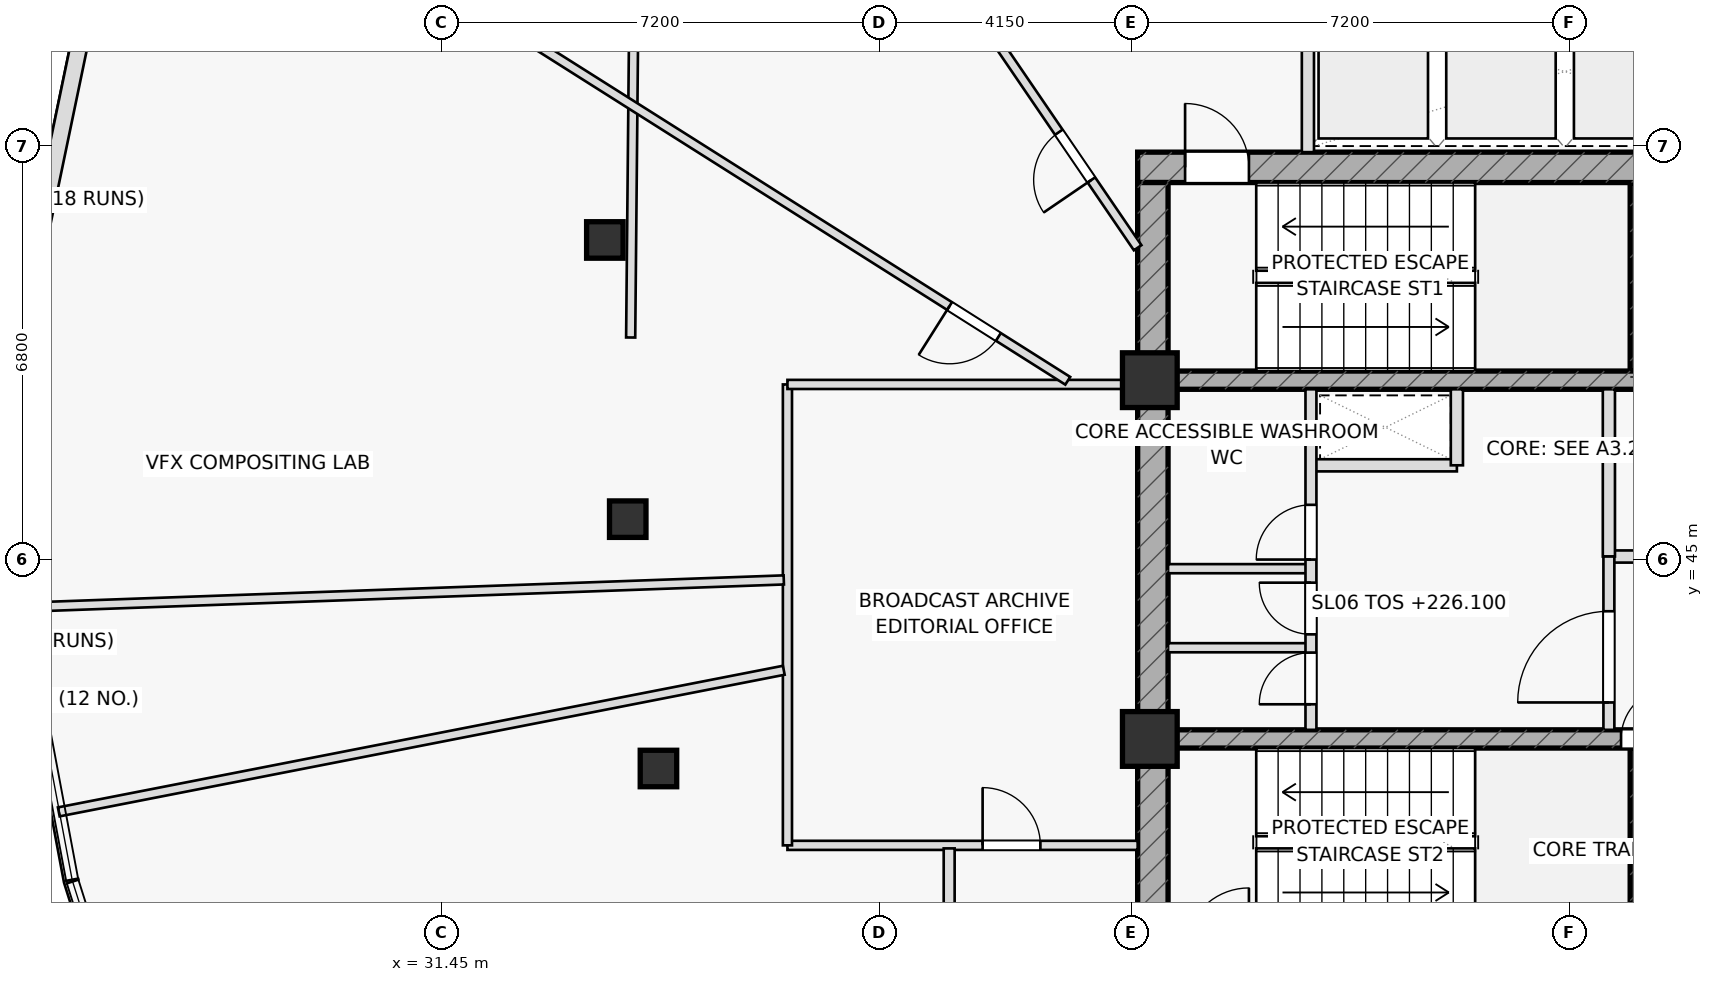
"""IFC4 building model, lengths in metres.
Left out: names, types, materials, properties, quantities, classifications, styles, units other than length and angle.
Written with IfcOpenShell. Run it as: python <this file> out.ifc"""

import sys

from ifc_helpers import new_model, si_unit, direction, frame, frame_2d, origin, origin_2d, place, context, subcontext, project, spatial, rectangle, hollow_rectangle, extrude, element, fill, save


model = new_model("IFC4")
c1 = context("Model", 3, precision=1e-05, world=origin(), true_north=direction((0.0, 1.0)))
c2 = subcontext(c1, "Body", "Model", "MODEL_VIEW")
j1 = project(units=[si_unit("LENGTHUNIT", "METRE"), si_unit("PLANEANGLEUNIT", "RADIAN")], contexts=[c1])
p1 = place(None, origin())
s1 = spatial("IfcSite", under=j1, at=p1, CompositionType="ELEMENT")
p2 = place(p1, origin())
s2 = spatial("IfcBuilding", under=s1, at=p2, CompositionType="ELEMENT")
p3 = place(p2, frame((0.0, 0.0, 226.1)))
s3 = spatial("IfcBuildingStorey", under=s2, at=p3, CompositionType="ELEMENT", Elevation=226.1)
for number, where, z_axis, x_axis in (
    (1, (51.11, 48.1, 0.0), (0.0, 0.0, 1.0), (0.0, 1.0, 0.0)),
    (2, (51.11, 38.8, 0.0), (0.0, 0.0, 1.0), (0.0, 1.0, 0.0)),
):
    element("IfcWall", number, at=place(p3, frame(where, z_axis=z_axis, x_axis=x_axis)), inside=s3, PredefinedType="SHEAR", context=c2, shape_type="SweptSolid", body=[
        extrude(rectangle(XDim=3.1, YDim=0.22, at=frame_2d((1.55, 0.0))), origin(), (0.0, 0.0, 1.0), 3.65),
    ])
p4 = place(p3, frame((42.9, 51.45, 0.0), z_axis=(0.0, 0.0, 1.0), x_axis=(1.0, 0.0, 0.0)))
e3 = element("IfcWall", 3, at=p4, inside=s3, PredefinedType="SHEAR", context=c2, shape_type="SweptSolid", body=[
    extrude(rectangle(XDim=14.2, YDim=0.5, at=frame_2d((7.1, 0.0))), origin(), (0.0, 0.0, 1.0), 3.65),
])
p5 = place(p4, frame((0.78, 0.0, 0.0)))
e4 = element("IfcOpeningElement", 4, at=p5, cuts=e3, PredefinedType="OPENING", context=c2, shape_type="SweptSolid", body=[
    extrude(rectangle(XDim=1.05, YDim=2.2, at=frame_2d((0.525, 1.1))), frame((0.0, 0.26, 0.0), z_axis=(0.0, -1.0, 0.0), x_axis=(1.0, 0.0, 0.0)), (0.0, 0.0, 1.0), 0.52),
])
p6 = place(p3, frame((43.15, 38.8, 0.0), z_axis=(0.0, 0.0, 1.0), x_axis=(0.0, 1.0, 0.0)))
e5 = element("IfcWall", 5, at=p6, inside=s3, PredefinedType="SHEAR", context=c2, shape_type="SweptSolid", body=[
    extrude(rectangle(XDim=12.4, YDim=0.5, at=frame_2d((6.2, 0.0))), origin(), (0.0, 0.0, 1.0), 3.65),
])
p7 = place(p3, frame((43.4, 47.95, 0.0), z_axis=(0.0, 0.0, 1.0), x_axis=(1.0, 0.0, 0.0)))
e6 = element("IfcWall", 6, at=p7, inside=s3, PredefinedType="SHEAR", context=c2, shape_type="SweptSolid", body=[
    extrude(rectangle(XDim=13.2, YDim=0.3, at=frame_2d((6.6, 0.0))), origin(), (0.0, 0.0, 1.0), 3.65),
])
p8 = place(p7, frame((8.345, 0.0, 0.0)))
e7 = element("IfcOpeningElement", 7, at=p8, cuts=e6, PredefinedType="OPENING", context=c2, shape_type="SweptSolid", body=[
    extrude(rectangle(XDim=1.15, YDim=2.2, at=frame_2d((0.575, 1.1))), frame((0.0, 0.16, 0.0), z_axis=(0.0, -1.0, 0.0), x_axis=(1.0, 0.0, 0.0)), (0.0, 0.0, 1.0), 0.32),
])
p9 = place(p7, frame((10.065, 0.0, 0.0)))
e8 = element("IfcOpeningElement", 8, at=p9, cuts=e6, PredefinedType="OPENING", context=c2, shape_type="SweptSolid", body=[
    extrude(rectangle(XDim=1.15, YDim=2.2, at=frame_2d((0.575, 1.1))), frame((0.0, 0.16, 0.0), z_axis=(0.0, -1.0, 0.0), x_axis=(1.0, 0.0, 0.0)), (0.0, 0.0, 1.0), 0.32),
])
p10 = place(p7, frame((11.645, 0.0, 0.0)))
e9 = element("IfcOpeningElement", 9, at=p10, cuts=e6, PredefinedType="OPENING", context=c2, shape_type="SweptSolid", body=[
    extrude(rectangle(XDim=1.15, YDim=2.2, at=frame_2d((0.575, 1.1))), frame((0.0, 0.16, 0.0), z_axis=(0.0, -1.0, 0.0), x_axis=(1.0, 0.0, 0.0)), (0.0, 0.0, 1.0), 0.32),
])
p11 = place(p3, frame((43.4, 42.05, 0.0), z_axis=(0.0, 0.0, 1.0), x_axis=(1.0, 0.0, 0.0)))
e10 = element("IfcWall", 10, at=p11, inside=s3, PredefinedType="SHEAR", context=c2, shape_type="SweptSolid", body=[
    extrude(rectangle(XDim=13.2, YDim=0.3, at=frame_2d((6.6, 0.0))), origin(), (0.0, 0.0, 1.0), 3.65),
])
p12 = place(p11, frame((7.45, 0.0, 0.0)))
e11 = element("IfcOpeningElement", 11, at=p12, cuts=e10, PredefinedType="OPENING", context=c2, shape_type="SweptSolid", body=[
    extrude(rectangle(XDim=0.85, YDim=2.05, at=frame_2d((0.425, 1.025))), frame((0.0, 0.16, 0.0), z_axis=(0.0, -1.0, 0.0), x_axis=(1.0, 0.0, 0.0)), (0.0, 0.0, 1.0), 0.32),
])
p13 = place(p11, frame((9.5, 0.0, 0.0)))
e12 = element("IfcOpeningElement", 12, at=p13, cuts=e10, PredefinedType="OPENING", context=c2, shape_type="SweptSolid", body=[
    extrude(rectangle(XDim=0.85, YDim=2.05, at=frame_2d((0.425, 1.025))), frame((0.0, 0.16, 0.0), z_axis=(0.0, -1.0, 0.0), x_axis=(1.0, 0.0, 0.0)), (0.0, 0.0, 1.0), 0.32),
])
p14 = place(p11, frame((11.6, 0.0, 0.0)))
e13 = element("IfcOpeningElement", 13, at=p14, cuts=e10, PredefinedType="OPENING", context=c2, shape_type="SweptSolid", body=[
    extrude(rectangle(XDim=0.85, YDim=2.05, at=frame_2d((0.425, 1.025))), frame((0.0, 0.16, 0.0), z_axis=(0.0, -1.0, 0.0), x_axis=(1.0, 0.0, 0.0)), (0.0, 0.0, 1.0), 0.32),
])
for number, where, z_axis, x_axis in (
    (14, (43.1, 47.95, 0.0), (0.0, 0.0, 1.0), (1.0, 0.0, 0.0)),
    (15, (43.1, 42.05, 0.0), (0.0, 0.0, 1.0), (1.0, 0.0, 0.0)),
):
    element("IfcColumn", number, at=place(p3, frame(where, z_axis=z_axis, x_axis=x_axis)), inside=s3, PredefinedType="COLUMN", context=c2, shape_type="SweptSolid", body=[
        extrude(rectangle(XDim=0.9, YDim=0.9, at=origin_2d()), origin(), (0.0, 0.0, 1.0), 3.65),
    ])
for number, where, z_axis, x_axis in (
    (16, (34.137, 50.256, 0.0), (0.0, 0.0, 1.0), (1.0, 0.0, 0.0)),
    (17, (34.514, 45.665, 0.0), (0.0, 0.0, 1.0), (1.0, 0.0, 0.0)),
    (18, (35.019, 41.564, 0.0), (0.0, 0.0, 1.0), (1.0, 0.0, 0.0)),
):
    element("IfcColumn", number, at=place(p3, frame(where, z_axis=z_axis, x_axis=x_axis)), inside=s3, PredefinedType="COLUMN", context=c2, shape_type="SweptSolid", body=[
        extrude(hollow_rectangle(XDim=0.6, YDim=0.6, WallThickness=0.036, at=origin_2d()), origin(), (0.0, 0.0, 1.0), 3.65),
    ])
p15 = place(p3, frame((45.7, 51.7, 0.0), z_axis=(0.0, 0.0, 1.0), x_axis=(0.0, 1.0, 0.0)))
e19 = element("IfcWall", 19, at=p15, inside=s3, PredefinedType="PARTITIONING", context=c2, shape_type="SweptSolid", body=[
    extrude(rectangle(XDim=2.6, YDim=0.2, at=frame_2d((1.3, 0.0))), origin(), (0.0, 0.0, 1.0), 3.65),
])
p16 = place(p3, frame((45.75, 46.55, 0.0), z_axis=(0.0, 0.0, 1.0), x_axis=(1.0, 0.0, 0.0)))
e20 = element("IfcWall", 20, at=p16, inside=s3, PredefinedType="PARTITIONING", context=c2, shape_type="SweptSolid", body=[
    extrude(rectangle(XDim=2.4, YDim=0.2, at=frame_2d((1.2, 0.0))), origin(), (0.0, 0.0, 1.0), 3.65),
])
p17 = place(p3, frame((48.15, 46.55, 0.0), z_axis=(0.0, 0.0, 1.0), x_axis=(0.0, 1.0, 0.0)))
e21 = element("IfcWall", 21, at=p17, inside=s3, PredefinedType="PARTITIONING", context=c2, shape_type="SweptSolid", body=[
    extrude(rectangle(XDim=1.25, YDim=0.2, at=frame_2d((0.625, 0.0))), origin(), (0.0, 0.0, 1.0), 3.65),
])
p18 = place(p3, frame((50.65, 45.05, 0.0), z_axis=(0.0, 0.0, 1.0), x_axis=(1.0, 0.0, 0.0)))
e22 = element("IfcWall", 22, at=p18, inside=s3, PredefinedType="PARTITIONING", context=c2, shape_type="SweptSolid", body=[
    extrude(rectangle(XDim=5.95, YDim=0.2, at=frame_2d((2.975, 0.0))), origin(), (0.0, 0.0, 1.0), 3.65),
])
p19 = place(p18, frame((1.35, 0.0, 0.0)))
e23 = element("IfcOpeningElement", 23, at=p19, cuts=e22, PredefinedType="OPENING", context=c2, shape_type="SweptSolid", body=[
    extrude(rectangle(XDim=1.5, YDim=2.2, at=frame_2d((0.75, 1.1))), frame((0.0, 0.11, 0.0), z_axis=(0.0, -1.0, 0.0), x_axis=(1.0, 0.0, 0.0)), (0.0, 0.0, 1.0), 0.22),
])
p20 = place(p3, frame((50.65, 45.05, 0.0), z_axis=(0.0, 0.0, 1.0), x_axis=(0.0, 1.0, 0.0)))
e24 = element("IfcWall", 24, at=p20, inside=s3, PredefinedType="PARTITIONING", context=c2, shape_type="SweptSolid", body=[
    extrude(rectangle(XDim=2.75, YDim=0.2, at=frame_2d((1.375, 0.0))), origin(), (0.0, 0.0, 1.0), 3.65),
])
p21 = place(p3, frame((50.65, 42.2, 0.0), z_axis=(0.0, 0.0, 1.0), x_axis=(0.0, 1.0, 0.0)))
e25 = element("IfcWall", 25, at=p21, inside=s3, PredefinedType="PARTITIONING", context=c2, shape_type="SweptSolid", body=[
    extrude(rectangle(XDim=2.85, YDim=0.18, at=frame_2d((1.425, 0.0))), origin(), (0.0, 0.0, 1.0), 3.65),
])
p22 = place(p21, frame((0.45, 0.0, 0.0)))
e26 = element("IfcOpeningElement", 26, at=p22, cuts=e25, PredefinedType="OPENING", context=c2, shape_type="SweptSolid", body=[
    extrude(rectangle(XDim=1.5, YDim=2.2, at=frame_2d((0.75, 1.1))), frame((0.0, 0.1, 0.0), z_axis=(0.0, -1.0, 0.0), x_axis=(1.0, 0.0, 0.0)), (0.0, 0.0, 1.0), 0.2),
])
for number, where, z_axis, x_axis in (
    (27, (43.4, 43.55, 0.0), (0.0, 0.0, 1.0), (1.0, 0.0, 0.0)),
    (28, (43.4, 44.85, 0.0), (0.0, 0.0, 1.0), (1.0, 0.0, 0.0)),
):
    element("IfcWall", number, at=place(p3, frame(where, z_axis=z_axis, x_axis=x_axis)), inside=s3, PredefinedType="PARTITIONING", context=c2, shape_type="SweptSolid", body=[
        extrude(rectangle(XDim=2.35, YDim=0.15, at=frame_2d((1.175, 0.0))), origin(), (0.0, 0.0, 1.0), 3.65),
    ])
p23 = place(p3, frame((45.75, 42.2, 0.0), z_axis=(0.0, 0.0, 1.0), x_axis=(0.0, 1.0, 0.0)))
e29 = element("IfcWall", 29, at=p23, inside=s3, PredefinedType="PARTITIONING", context=c2, shape_type="SweptSolid", body=[
    extrude(rectangle(XDim=5.6, YDim=0.18, at=frame_2d((2.8, 0.0))), origin(), (0.0, 0.0, 1.0), 3.65),
])
p24 = place(p23, frame((0.42, 0.0, 0.0)))
e30 = element("IfcOpeningElement", 30, at=p24, cuts=e29, PredefinedType="OPENING", context=c2, shape_type="SweptSolid", body=[
    extrude(rectangle(XDim=0.85, YDim=2.05, at=frame_2d((0.425, 1.025))), frame((0.0, 0.1, 0.0), z_axis=(0.0, -1.0, 0.0), x_axis=(1.0, 0.0, 0.0)), (0.0, 0.0, 1.0), 0.2),
])
p25 = place(p23, frame((1.57, 0.0, 0.0)))
e31 = element("IfcOpeningElement", 31, at=p25, cuts=e29, PredefinedType="OPENING", context=c2, shape_type="SweptSolid", body=[
    extrude(rectangle(XDim=0.85, YDim=2.05, at=frame_2d((0.425, 1.025))), frame((0.0, 0.1, 0.0), z_axis=(0.0, -1.0, 0.0), x_axis=(1.0, 0.0, 0.0)), (0.0, 0.0, 1.0), 0.2),
])
p26 = place(p23, frame((2.8, 0.0, 0.0)))
e32 = element("IfcOpeningElement", 32, at=p26, cuts=e29, PredefinedType="OPENING", context=c2, shape_type="SweptSolid", body=[
    extrude(rectangle(XDim=0.9, YDim=2.05, at=frame_2d((0.45, 1.025))), frame((0.0, 0.1, 0.0), z_axis=(0.0, -1.0, 0.0), x_axis=(1.0, 0.0, 0.0)), (0.0, 0.0, 1.0), 0.2),
])
p27 = place(p3, frame((34.652, 58.056, 0.0), z_axis=(0.0, 0.0, 1.0), x_axis=(-0.009553538759, -0.999954363907, 0.0)))
e33 = element("IfcWall", 33, at=p27, inside=s3, PredefinedType="PARTITIONING", context=c2, shape_type="SweptSolid", body=[
    extrude(rectangle(XDim=9.404, YDim=0.15, at=frame_2d((4.702, 0.0))), origin(), (0.0, 0.0, 1.0), 3.135),
])
p28 = place(p3, frame((37.14, 40.3, 0.0), z_axis=(0.0, 0.0, 1.0), x_axis=(1.0, 0.0, 0.0)))
e34 = element("IfcWall", 34, at=p28, inside=s3, PredefinedType="PARTITIONING", context=c2, shape_type="SweptSolid", body=[
    extrude(rectangle(XDim=5.76, YDim=0.15, at=frame_2d((2.88, 0.0))), origin(), (0.0, 0.0, 1.0), 3.025),
])
p29 = place(p28, frame((3.21, 0.0, 0.0)))
e35 = element("IfcOpeningElement", 35, at=p29, cuts=e34, PredefinedType="OPENING", context=c2, shape_type="SweptSolid", body=[
    extrude(rectangle(XDim=0.95, YDim=2.05, at=frame_2d((0.475, 1.025))), frame((0.0, 0.085, 0.0), z_axis=(0.0, -1.0, 0.0), x_axis=(1.0, 0.0, 0.0)), (0.0, 0.0, 1.0), 0.17),
])
p30 = place(p3, frame((37.14, 40.3, 0.0), z_axis=(0.0, 0.0, 1.0), x_axis=(0.0, 1.0, 0.0)))
e36 = element("IfcWall", 36, at=p30, inside=s3, PredefinedType="PARTITIONING", context=c2, shape_type="SweptSolid", body=[
    extrude(rectangle(XDim=7.58, YDim=0.15, at=frame_2d((3.79, 0.0))), origin(), (0.0, 0.0, 1.0), 3.65),
])
p31 = place(p3, frame((37.14, 47.88, 0.0), z_axis=(0.0, 0.0, 1.0), x_axis=(1.0, 0.0, 0.0)))
e37 = element("IfcWall", 37, at=p31, inside=s3, PredefinedType="PARTITIONING", context=c2, shape_type="SweptSolid", body=[
    extrude(rectangle(XDim=5.76, YDim=0.15, at=frame_2d((2.88, 0.0))), origin(), (0.0, 0.0, 1.0), 3.025),
])
p32 = place(p3, frame((42.9, 50.128, 0.0), z_axis=(0.0, 0.0, 1.0), x_axis=(-0.563748413046, 0.825946564124, 0.0)))
e38 = element("IfcWall", 38, at=p32, inside=s3, PredefinedType="PARTITIONING", context=c2, shape_type="SweptSolid", body=[
    extrude(rectangle(XDim=19.083, YDim=0.15, at=frame_2d((9.542, 0.0))), origin(), (0.0, 0.0, 1.0), 3.025),
])
p33 = place(p32, frame((1.35, 0.0, 0.0)))
e39 = element("IfcOpeningElement", 39, at=p33, cuts=e38, PredefinedType="OPENING", context=c2, shape_type="SweptSolid", body=[
    extrude(rectangle(XDim=0.95, YDim=2.05, at=frame_2d((0.475, 1.025))), frame((0.0, 0.085, 0.0), z_axis=(0.0, -1.0, 0.0), x_axis=(1.0, 0.0, 0.0)), (0.0, 0.0, 1.0), 0.17),
])
p34 = place(p3, frame((41.75, 47.94, 0.0), z_axis=(0.0, 0.0, 1.0), x_axis=(-0.845215418547, 0.534425763086, 0.0)))
e40 = element("IfcWall", 40, at=p34, inside=s3, PredefinedType="PARTITIONING", context=c2, shape_type="SweptSolid", body=[
    extrude(rectangle(XDim=18.802, YDim=0.15, at=frame_2d((9.401, 0.0))), origin(), (0.0, 0.0, 1.0), 3.025),
])
p35 = place(p34, frame((1.35, 0.0, 0.0)))
e41 = element("IfcOpeningElement", 41, at=p35, cuts=e40, PredefinedType="OPENING", context=c2, shape_type="SweptSolid", body=[
    extrude(rectangle(XDim=0.95, YDim=2.05, at=frame_2d((0.475, 1.025))), frame((0.0, 0.085, 0.0), z_axis=(0.0, -1.0, 0.0), x_axis=(1.0, 0.0, 0.0)), (0.0, 0.0, 1.0), 0.17),
])
p36 = place(p3, frame((37.08, 44.665, 0.0), z_axis=(0.0, 0.0, 1.0), x_axis=(-0.999354882677, -0.035914042805, 0.0)))
e42 = element("IfcWall", 42, at=p36, inside=s3, PredefinedType="PARTITIONING", context=c2, shape_type="SweptSolid", body=[
    extrude(rectangle(XDim=12.562, YDim=0.15, at=frame_2d((6.281, 0.0))), origin(), (0.0, 0.0, 1.0), 3.135),
])
p37 = place(p3, frame((37.08, 43.179, 0.0), z_axis=(0.0, 0.0, 1.0), x_axis=(-0.981454920946, -0.19169308321, 0.0)))
e43 = element("IfcWall", 43, at=p37, inside=s3, PredefinedType="PARTITIONING", context=c2, shape_type="SweptSolid", body=[
    extrude(rectangle(XDim=12.149, YDim=0.15, at=frame_2d((6.074, 0.0))), origin(), (0.0, 0.0, 1.0), 3.135),
])
p38 = place(p3, frame((39.8, 36.17, 0.0), z_axis=(0.0, 0.0, 1.0), x_axis=(0.0, 1.0, 0.0)))
e44 = element("IfcWall", 44, at=p38, inside=s3, PredefinedType="PARTITIONING", context=c2, shape_type="SweptSolid", body=[
    extrude(rectangle(XDim=4.08, YDim=0.18, at=frame_2d((2.04, 0.0))), origin(), (0.0, 0.0, 1.0), 3.325),
])
p39 = place(p38, frame((0.929, 0.0, 0.0)))
e45 = element("IfcOpeningElement", 45, at=p39, cuts=e44, PredefinedType="OPENING", context=c2, shape_type="SweptSolid", body=[
    extrude(rectangle(XDim=0.95, YDim=2.05, at=frame_2d((0.475, 1.025))), frame((0.0, 0.1, 0.0), z_axis=(0.0, -1.0, 0.0), x_axis=(1.0, 0.0, 0.0)), (0.0, 0.0, 1.0), 0.2),
])
p40 = place(p3, frame((25.657, 54.261, 0.0), z_axis=(0.0, 0.0, 1.0), x_axis=(-0.203778439019, -0.97901703141, 0.0)))
e46 = element("IfcWall", 46, at=p40, inside=s3, PredefinedType="STANDARD", context=c2, shape_type="SweptSolid", body=[
    extrude(rectangle(XDim=7.763, YDim=0.28, at=frame_2d((3.882, 0.0))), origin(), (0.0, 0.0, 1.0), 3.65),
])
p41 = place(p5, origin())
e47 = element("IfcDoor", 47, at=p41, inside=s3, OperationType="SINGLE_SWING_LEFT", PredefinedType="DOOR", context=c2, shape_type="SweptSolid", body=[
    extrude(rectangle(XDim=1.05, YDim=2.2, at=frame_2d((0.525, 1.1))), frame((0.0, 0.025, 0.0), z_axis=(0.0, -1.0, 0.0), x_axis=(1.0, 0.0, 0.0)), (0.0, 0.0, 1.0), 0.05),
])
fill(e4, e47)
p42 = place(p22, origin())
e48 = element("IfcDoor", 48, at=p42, inside=s3, OperationType="SINGLE_SWING_LEFT", PredefinedType="DOOR", context=c2, shape_type="SweptSolid", body=[
    extrude(rectangle(XDim=1.5, YDim=2.2, at=frame_2d((0.75, 1.1))), frame((0.0, 0.025, 0.0), z_axis=(0.0, -1.0, 0.0), x_axis=(1.0, 0.0, 0.0)), (0.0, 0.0, 1.0), 0.05),
])
fill(e26, e48)
p43 = place(p12, origin())
e49 = element("IfcDoor", 49, at=p43, inside=s3, OperationType="SINGLE_SWING_RIGHT", PredefinedType="DOOR", context=c2, shape_type="SweptSolid", body=[
    extrude(rectangle(XDim=0.85, YDim=2.05, at=frame_2d((0.425, 1.025))), frame((0.0, 0.025, 0.0), z_axis=(0.0, -1.0, 0.0), x_axis=(1.0, 0.0, 0.0)), (0.0, 0.0, 1.0), 0.05),
])
fill(e11, e49)
p44 = place(p24, origin())
e50 = element("IfcDoor", 50, at=p44, inside=s3, OperationType="SINGLE_SWING_LEFT", PredefinedType="DOOR", context=c2, shape_type="SweptSolid", body=[
    extrude(rectangle(XDim=0.85, YDim=2.05, at=frame_2d((0.425, 1.025))), frame((0.0, 0.025, 0.0), z_axis=(0.0, -1.0, 0.0), x_axis=(1.0, 0.0, 0.0)), (0.0, 0.0, 1.0), 0.05),
])
fill(e30, e50)
p45 = place(p25, origin())
e51 = element("IfcDoor", 51, at=p45, inside=s3, OperationType="SINGLE_SWING_RIGHT", PredefinedType="DOOR", context=c2, shape_type="SweptSolid", body=[
    extrude(rectangle(XDim=0.85, YDim=2.05, at=frame_2d((0.425, 1.025))), frame((0.0, 0.025, 0.0), z_axis=(0.0, -1.0, 0.0), x_axis=(1.0, 0.0, 0.0)), (0.0, 0.0, 1.0), 0.05),
])
fill(e31, e51)
p46 = place(p26, origin())
e52 = element("IfcDoor", 52, at=p46, inside=s3, OperationType="SINGLE_SWING_LEFT", PredefinedType="DOOR", context=c2, shape_type="SweptSolid", body=[
    extrude(rectangle(XDim=0.9, YDim=2.05, at=frame_2d((0.45, 1.025))), frame((0.0, 0.025, 0.0), z_axis=(0.0, -1.0, 0.0), x_axis=(1.0, 0.0, 0.0)), (0.0, 0.0, 1.0), 0.05),
])
fill(e32, e52)
p47 = place(p29, origin())
e53 = element("IfcDoor", 53, at=p47, inside=s3, OperationType="SINGLE_SWING_LEFT", PredefinedType="DOOR", context=c2, shape_type="SweptSolid", body=[
    extrude(rectangle(XDim=0.95, YDim=2.05, at=frame_2d((0.475, 1.025))), frame((0.0, 0.025, 0.0), z_axis=(0.0, -1.0, 0.0), x_axis=(1.0, 0.0, 0.0)), (0.0, 0.0, 1.0), 0.05),
])
fill(e35, e53)
p48 = place(p33, origin())
e54 = element("IfcDoor", 54, at=p48, inside=s3, OperationType="SINGLE_SWING_LEFT", PredefinedType="DOOR", context=c2, shape_type="SweptSolid", body=[
    extrude(rectangle(XDim=0.95, YDim=2.05, at=frame_2d((0.475, 1.025))), frame((0.0, 0.025, 0.0), z_axis=(0.0, -1.0, 0.0), x_axis=(1.0, 0.0, 0.0)), (0.0, 0.0, 1.0), 0.05),
])
fill(e39, e54)
p49 = place(p35, origin())
e55 = element("IfcDoor", 55, at=p49, inside=s3, OperationType="SINGLE_SWING_RIGHT", PredefinedType="DOOR", context=c2, shape_type="SweptSolid", body=[
    extrude(rectangle(XDim=0.95, YDim=2.05, at=frame_2d((0.475, 1.025))), frame((0.0, 0.025, 0.0), z_axis=(0.0, -1.0, 0.0), x_axis=(1.0, 0.0, 0.0)), (0.0, 0.0, 1.0), 0.05),
])
fill(e41, e55)
save(model, sys.argv[1])
